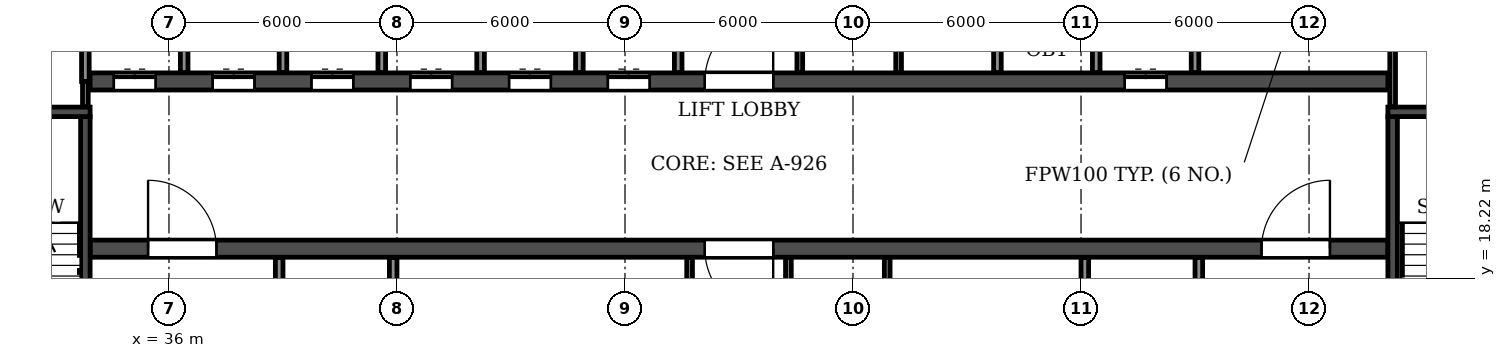
"""IFC4 building model, lengths in metres.
Left out: names, types, materials, properties, quantities, classifications, styles, units other than length and angle.
Written with IfcOpenShell. Run it as: python <this file> out.ifc"""

import sys

from ifc_helpers import new_model, si_unit, direction, frame, frame_2d, origin, place, context, subcontext, project, spatial, rectangle, extrude, element, fill, save


model = new_model("IFC4")
c1 = context("Model", 3, precision=1e-05, world=origin(), true_north=direction((0.0, 1.0)))
c2 = subcontext(c1, "Body", "Model", "MODEL_VIEW")
j1 = project(units=[si_unit("LENGTHUNIT", "METRE"), si_unit("PLANEANGLEUNIT", "RADIAN")], contexts=[c1])
p1 = place(None, origin())
s1 = spatial("IfcSite", under=j1, at=p1, CompositionType="ELEMENT")
p2 = place(p1, origin())
s2 = spatial("IfcBuilding", under=s1, at=p2, CompositionType="ELEMENT")
p3 = place(p2, frame((0.0, 0.0, 142.2)))
s3 = spatial("IfcBuildingStorey", under=s2, at=p3, CompositionType="ELEMENT", Elevation=142.2)
p4 = place(p3, frame((33.925, 19.0, 0.0), z_axis=(0.0, 0.0, 1.0), x_axis=(1.0, 0.0, 0.0)))
e1 = element("IfcWall", 1, at=p4, inside=s3, PredefinedType="SOLIDWALL", context=c2, shape_type="SweptSolid", body=[
    extrude(rectangle(XDim=34.15, YDim=0.45, at=frame_2d((17.075, 0.0))), origin(), (0.0, 0.0, 1.0), 3.07),
])
p5 = place(p4, frame((16.175, 0.0, 0.0)))
e2 = element("IfcOpeningElement", 2, at=p5, cuts=e1, PredefinedType="OPENING", context=c2, shape_type="SweptSolid", body=[
    extrude(rectangle(XDim=1.8, YDim=2.1, at=frame_2d((0.9, 1.05))), frame((0.0, 0.235, 0.0), z_axis=(0.0, -1.0, 0.0), x_axis=(1.0, 0.0, 0.0)), (0.0, 0.0, 1.0), 0.47),
])
p6 = place(p4, frame((1.525, 0.0, 0.0)))
e3 = element("IfcOpeningElement", 3, at=p6, cuts=e1, PredefinedType="OPENING", context=c2, shape_type="SweptSolid", body=[
    extrude(rectangle(XDim=1.8, YDim=2.1, at=frame_2d((0.9, 1.05))), frame((0.0, 0.235, 0.0), z_axis=(0.0, -1.0, 0.0), x_axis=(1.0, 0.0, 0.0)), (0.0, 0.0, 1.0), 0.47),
])
p7 = place(p4, frame((30.825, 0.0, 0.0)))
e4 = element("IfcOpeningElement", 4, at=p7, cuts=e1, PredefinedType="OPENING", context=c2, shape_type="SweptSolid", body=[
    extrude(rectangle(XDim=1.8, YDim=2.1, at=frame_2d((0.9, 1.05))), frame((0.0, 0.235, 0.0), z_axis=(0.0, -1.0, 0.0), x_axis=(1.0, 0.0, 0.0)), (0.0, 0.0, 1.0), 0.47),
])
p8 = place(p3, frame((33.925, 23.4, 0.0), z_axis=(0.0, 0.0, 1.0), x_axis=(1.0, 0.0, 0.0)))
e5 = element("IfcWall", 5, at=p8, inside=s3, PredefinedType="SOLIDWALL", context=c2, shape_type="SweptSolid", body=[
    extrude(rectangle(XDim=34.15, YDim=0.45, at=frame_2d((17.075, 0.0))), origin(), (0.0, 0.0, 1.0), 3.07),
])
p9 = place(p8, frame((16.175, 0.0, 0.0)))
e6 = element("IfcOpeningElement", 6, at=p9, cuts=e5, PredefinedType="OPENING", context=c2, shape_type="SweptSolid", body=[
    extrude(rectangle(XDim=1.8, YDim=2.1, at=frame_2d((0.9, 1.05))), frame((0.0, 0.235, 0.0), z_axis=(0.0, -1.0, 0.0), x_axis=(1.0, 0.0, 0.0)), (0.0, 0.0, 1.0), 0.47),
])
p10 = place(p8, frame((0.625, 0.0, 0.0)))
e7 = element("IfcOpeningElement", 7, at=p10, cuts=e5, PredefinedType="OPENING", context=c2, shape_type="SweptSolid", body=[
    extrude(rectangle(XDim=1.1, YDim=2.1, at=frame_2d((0.55, 1.05))), frame((0.0, 0.235, 0.0), z_axis=(0.0, -1.0, 0.0), x_axis=(1.0, 0.0, 0.0)), (0.0, 0.0, 1.0), 0.47),
])
p11 = place(p8, frame((3.225, 0.0, 0.0)))
e8 = element("IfcOpeningElement", 8, at=p11, cuts=e5, PredefinedType="OPENING", context=c2, shape_type="SweptSolid", body=[
    extrude(rectangle(XDim=1.1, YDim=2.1, at=frame_2d((0.55, 1.05))), frame((0.0, 0.235, 0.0), z_axis=(0.0, -1.0, 0.0), x_axis=(1.0, 0.0, 0.0)), (0.0, 0.0, 1.0), 0.47),
])
p12 = place(p8, frame((5.825, 0.0, 0.0)))
e9 = element("IfcOpeningElement", 9, at=p12, cuts=e5, PredefinedType="OPENING", context=c2, shape_type="SweptSolid", body=[
    extrude(rectangle(XDim=1.1, YDim=2.1, at=frame_2d((0.55, 1.05))), frame((0.0, 0.235, 0.0), z_axis=(0.0, -1.0, 0.0), x_axis=(1.0, 0.0, 0.0)), (0.0, 0.0, 1.0), 0.47),
])
p13 = place(p8, frame((8.425, 0.0, 0.0)))
e10 = element("IfcOpeningElement", 10, at=p13, cuts=e5, PredefinedType="OPENING", context=c2, shape_type="SweptSolid", body=[
    extrude(rectangle(XDim=1.1, YDim=2.1, at=frame_2d((0.55, 1.05))), frame((0.0, 0.235, 0.0), z_axis=(0.0, -1.0, 0.0), x_axis=(1.0, 0.0, 0.0)), (0.0, 0.0, 1.0), 0.47),
])
p14 = place(p8, frame((11.025, 0.0, 0.0)))
e11 = element("IfcOpeningElement", 11, at=p14, cuts=e5, PredefinedType="OPENING", context=c2, shape_type="SweptSolid", body=[
    extrude(rectangle(XDim=1.1, YDim=2.1, at=frame_2d((0.55, 1.05))), frame((0.0, 0.235, 0.0), z_axis=(0.0, -1.0, 0.0), x_axis=(1.0, 0.0, 0.0)), (0.0, 0.0, 1.0), 0.47),
])
p15 = place(p8, frame((13.625, 0.0, 0.0)))
e12 = element("IfcOpeningElement", 12, at=p15, cuts=e5, PredefinedType="OPENING", context=c2, shape_type="SweptSolid", body=[
    extrude(rectangle(XDim=1.1, YDim=2.1, at=frame_2d((0.55, 1.05))), frame((0.0, 0.235, 0.0), z_axis=(0.0, -1.0, 0.0), x_axis=(1.0, 0.0, 0.0)), (0.0, 0.0, 1.0), 0.47),
])
p16 = place(p8, frame((27.225, 0.0, 0.0)))
e13 = element("IfcOpeningElement", 13, at=p16, cuts=e5, PredefinedType="OPENING", context=c2, shape_type="SweptSolid", body=[
    extrude(rectangle(XDim=1.1, YDim=2.1, at=frame_2d((0.55, 1.05))), frame((0.0, 0.235, 0.0), z_axis=(0.0, -1.0, 0.0), x_axis=(1.0, 0.0, 0.0)), (0.0, 0.0, 1.0), 0.47),
])
p17 = place(p3, frame((33.8, 14.825, 0.0), z_axis=(0.0, 0.0, 1.0), x_axis=(0.0, 1.0, 0.0)))
e14 = element("IfcWall", 14, at=p17, inside=s3, PredefinedType="SOLIDWALL", context=c2, shape_type="SweptSolid", body=[
    extrude(rectangle(XDim=7.65, YDim=0.25, at=frame_2d((3.825, 0.0))), origin(), (0.0, 0.0, 1.0), 3.07),
])
p18 = place(p17, frame((0.475, 0.0, 0.0)))
e15 = element("IfcOpeningElement", 15, at=p18, cuts=e14, PredefinedType="OPENING", context=c2, shape_type="SweptSolid", body=[
    extrude(rectangle(XDim=1.0, YDim=2.1, at=frame_2d((0.5, 1.05))), frame((0.0, 0.135, 0.0), z_axis=(0.0, -1.0, 0.0), x_axis=(1.0, 0.0, 0.0)), (0.0, 0.0, 1.0), 0.27),
])
p19 = place(p3, frame((29.875, 22.6, 0.0), z_axis=(0.0, 0.0, 1.0), x_axis=(1.0, 0.0, 0.0)))
e16 = element("IfcWall", 16, at=p19, inside=s3, PredefinedType="SOLIDWALL", context=c2, shape_type="SweptSolid", body=[
    extrude(rectangle(XDim=4.05, YDim=0.25, at=frame_2d((2.025, 0.0))), origin(), (0.0, 0.0, 1.0), 3.07),
])
p20 = place(p3, frame((68.2, 14.825, 0.0), z_axis=(0.0, 0.0, 1.0), x_axis=(0.0, 1.0, 0.0)))
e17 = element("IfcWall", 17, at=p20, inside=s3, PredefinedType="SOLIDWALL", context=c2, shape_type="SweptSolid", body=[
    extrude(rectangle(XDim=7.65, YDim=0.25, at=frame_2d((3.825, 0.0))), origin(), (0.0, 0.0, 1.0), 3.07),
])
p21 = place(p20, frame((0.475, 0.0, 0.0)))
e18 = element("IfcOpeningElement", 18, at=p21, cuts=e17, PredefinedType="OPENING", context=c2, shape_type="SweptSolid", body=[
    extrude(rectangle(XDim=1.0, YDim=2.1, at=frame_2d((0.5, 1.05))), frame((0.0, 0.135, 0.0), z_axis=(0.0, -1.0, 0.0), x_axis=(1.0, 0.0, 0.0)), (0.0, 0.0, 1.0), 0.27),
])
p22 = place(p3, frame((68.075, 22.6, 0.0), z_axis=(0.0, 0.0, 1.0), x_axis=(1.0, 0.0, 0.0)))
e19 = element("IfcWall", 19, at=p22, inside=s3, PredefinedType="SOLIDWALL", context=c2, shape_type="SweptSolid", body=[
    extrude(rectangle(XDim=4.05, YDim=0.25, at=frame_2d((2.025, 0.0))), origin(), (0.0, 0.0, 1.0), 3.07),
])
for number, where, z_axis, x_axis in (
    (20, (49.7, 14.835, 0.0), (0.0, 0.0, 1.0), (0.0, 1.0, 0.0)),
    (21, (52.3, 14.835, 0.0), (0.0, 0.0, 1.0), (0.0, 1.0, 0.0)),
    (22, (52.6, 23.635, 0.0), (0.0, 0.0, 1.0), (0.0, 1.0, 0.0)),
    (23, (54.9, 14.835, 0.0), (0.0, 0.0, 1.0), (0.0, 1.0, 0.0)),
    (24, (55.2, 23.635, 0.0), (0.0, 0.0, 1.0), (0.0, 1.0, 0.0)),
):
    element("IfcWall", number, at=place(p3, frame(where, z_axis=z_axis, x_axis=x_axis)), inside=s3, PredefinedType="PARTITIONING", context=c2, shape_type="SweptSolid", body=[
        extrude(rectangle(XDim=3.93, YDim=0.15, at=frame_2d((1.965, 0.0))), origin(), (0.0, 0.0, 1.0), 3.07),
    ])
p23 = place(p3, frame((33.8, 22.735, 0.0), z_axis=(0.0, 0.0, 1.0), x_axis=(0.0, 1.0, 0.0)))
e25 = element("IfcWall", 25, at=p23, inside=s3, PredefinedType="PARTITIONING", context=c2, shape_type="SweptSolid", body=[
    extrude(rectangle(XDim=0.665, YDim=0.15, at=frame_2d((0.333, 0.0))), origin(), (0.0, 0.0, 1.0), 3.07),
])
p24 = place(p3, frame((68.2, 22.735, 0.0), z_axis=(0.0, 0.0, 1.0), x_axis=(0.0, 1.0, 0.0)))
e26 = element("IfcWall", 26, at=p24, inside=s3, PredefinedType="PARTITIONING", context=c2, shape_type="SweptSolid", body=[
    extrude(rectangle(XDim=4.83, YDim=0.15, at=frame_2d((2.415, 0.0))), origin(), (0.0, 0.0, 1.0), 3.07),
])
p25 = place(p3, frame((33.8, 23.4, 0.0), z_axis=(0.0, 0.0, 1.0), x_axis=(0.0, 1.0, 0.0)))
e27 = element("IfcWall", 27, at=p25, inside=s3, PredefinedType="PARTITIONING", context=c2, shape_type="SweptSolid", body=[
    extrude(rectangle(XDim=2.7, YDim=0.2, at=frame_2d((1.35, 0.0))), origin(), (0.0, 0.0, 1.0), 3.07),
])
p26 = place(p3, frame((36.4, 23.635, 0.0), z_axis=(0.0, 0.0, 1.0), x_axis=(0.0, 1.0, 0.0)))
e28 = element("IfcWall", 28, at=p26, inside=s3, PredefinedType="PARTITIONING", context=c2, shape_type="SweptSolid", body=[
    extrude(rectangle(XDim=2.465, YDim=0.2, at=frame_2d((1.232, 0.0))), origin(), (0.0, 0.0, 1.0), 3.07),
])
p27 = place(p3, frame((38.9, 14.835, 0.0), z_axis=(0.0, 0.0, 1.0), x_axis=(0.0, 1.0, 0.0)))
e29 = element("IfcWall", 29, at=p27, inside=s3, PredefinedType="PARTITIONING", context=c2, shape_type="SweptSolid", body=[
    extrude(rectangle(XDim=3.93, YDim=0.2, at=frame_2d((1.965, 0.0))), origin(), (0.0, 0.0, 1.0), 3.07),
])
p28 = place(p27, frame((1.415, 0.0, 0.0)))
e30 = element("IfcOpeningElement", 30, at=p28, cuts=e29, PredefinedType="OPENING", context=c2, shape_type="SweptSolid", body=[
    extrude(rectangle(XDim=1.1, YDim=2.1, at=frame_2d((0.55, 1.05))), frame((0.0, 0.11, 0.0), z_axis=(0.0, -1.0, 0.0), x_axis=(1.0, 0.0, 0.0)), (0.0, 0.0, 1.0), 0.22),
])
for number, where, z_axis, x_axis in (
    (31, (39.0, 23.635, 0.0), (0.0, 0.0, 1.0), (0.0, 1.0, 0.0)),
    (32, (41.6, 23.635, 0.0), (0.0, 0.0, 1.0), (0.0, 1.0, 0.0)),
):
    element("IfcWall", number, at=place(p3, frame(where, z_axis=z_axis, x_axis=x_axis)), inside=s3, PredefinedType="PARTITIONING", context=c2, shape_type="SweptSolid", body=[
        extrude(rectangle(XDim=2.465, YDim=0.2, at=frame_2d((1.232, 0.0))), origin(), (0.0, 0.0, 1.0), 3.07),
    ])
for number, where, z_axis, x_axis in (
    (33, (41.9, 14.835, 0.0), (0.0, 0.0, 1.0), (0.0, 1.0, 0.0)),
    (34, (44.2, 23.635, 0.0), (0.0, 0.0, 1.0), (0.0, 1.0, 0.0)),
    (35, (46.8, 23.635, 0.0), (0.0, 0.0, 1.0), (0.0, 1.0, 0.0)),
):
    element("IfcWall", number, at=place(p3, frame(where, z_axis=z_axis, x_axis=x_axis)), inside=s3, PredefinedType="PARTITIONING", context=c2, shape_type="SweptSolid", body=[
        extrude(rectangle(XDim=3.93, YDim=0.2, at=frame_2d((1.965, 0.0))), origin(), (0.0, 0.0, 1.0), 3.07),
    ])
for number, where, z_axis, x_axis in (
    (36, (49.4, 23.635, 0.0), (0.0, 0.0, 1.0), (0.0, 1.0, 0.0)),
    (37, (57.8, 23.635, 0.0), (0.0, 0.0, 1.0), (0.0, 1.0, 0.0)),
):
    element("IfcWall", number, at=place(p3, frame(where, z_axis=z_axis, x_axis=x_axis)), inside=s3, PredefinedType="PARTITIONING", context=c2, shape_type="SweptSolid", body=[
        extrude(rectangle(XDim=2.465, YDim=0.2, at=frame_2d((1.232, 0.0))), origin(), (0.0, 0.0, 1.0), 3.07),
    ])
p29 = place(p3, frame((60.1, 14.835, 0.0), z_axis=(0.0, 0.0, 1.0), x_axis=(0.0, 1.0, 0.0)))
e38 = element("IfcWall", 38, at=p29, inside=s3, PredefinedType="PARTITIONING", context=c2, shape_type="SweptSolid", body=[
    extrude(rectangle(XDim=3.93, YDim=0.2, at=frame_2d((1.965, 0.0))), origin(), (0.0, 0.0, 1.0), 3.07),
])
for number, where, z_axis, x_axis in (
    (39, (60.4, 23.635, 0.0), (0.0, 0.0, 1.0), (0.0, 1.0, 0.0)),
    (40, (63.0, 23.635, 0.0), (0.0, 0.0, 1.0), (0.0, 1.0, 0.0)),
):
    element("IfcWall", number, at=place(p3, frame(where, z_axis=z_axis, x_axis=x_axis)), inside=s3, PredefinedType="PARTITIONING", context=c2, shape_type="SweptSolid", body=[
        extrude(rectangle(XDim=2.465, YDim=0.2, at=frame_2d((1.232, 0.0))), origin(), (0.0, 0.0, 1.0), 3.07),
    ])
p30 = place(p3, frame((63.1, 14.835, 0.0), z_axis=(0.0, 0.0, 1.0), x_axis=(0.0, 1.0, 0.0)))
e41 = element("IfcWall", 41, at=p30, inside=s3, PredefinedType="PARTITIONING", context=c2, shape_type="SweptSolid", body=[
    extrude(rectangle(XDim=3.93, YDim=0.2, at=frame_2d((1.965, 0.0))), origin(), (0.0, 0.0, 1.0), 3.07),
])
p31 = place(p30, frame((1.415, 0.0, 0.0)))
e42 = element("IfcOpeningElement", 42, at=p31, cuts=e41, PredefinedType="OPENING", context=c2, shape_type="SweptSolid", body=[
    extrude(rectangle(XDim=1.1, YDim=2.1, at=frame_2d((0.55, 1.05))), frame((0.0, 0.11, 0.0), z_axis=(0.0, -1.0, 0.0), x_axis=(1.0, 0.0, 0.0)), (0.0, 0.0, 1.0), 0.22),
])
p32 = place(p9, origin())
e43 = element("IfcDoor", 43, at=p32, inside=s3, OperationType="DOUBLE_DOOR_SINGLE_SWING", PredefinedType="DOOR", context=c2, shape_type="SweptSolid", body=[
    extrude(rectangle(XDim=1.8, YDim=2.1, at=frame_2d((0.9, 1.05))), frame((0.0, 0.025, 0.0), z_axis=(0.0, -1.0, 0.0), x_axis=(1.0, 0.0, 0.0)), (0.0, 0.0, 1.0), 0.05),
])
fill(e6, e43)
p33 = place(p5, frame((1.8, 0.0, 0.0), z_axis=(0.0, 0.0, 1.0), x_axis=(-1.0, 0.0, 0.0)))
e44 = element("IfcDoor", 44, at=p33, inside=s3, OperationType="DOUBLE_DOOR_SINGLE_SWING", PredefinedType="DOOR", context=c2, shape_type="SweptSolid", body=[
    extrude(rectangle(XDim=1.8, YDim=2.1, at=frame_2d((0.9, 1.05))), frame((0.0, 0.025, 0.0), z_axis=(0.0, -1.0, 0.0), x_axis=(1.0, 0.0, 0.0)), (0.0, 0.0, 1.0), 0.05),
])
fill(e2, e44)
p34 = place(p10, origin())
e45 = element("IfcDoor", 45, at=p34, inside=s3, OperationType="DOUBLE_DOOR_SLIDING", PredefinedType="DOOR", context=c2, shape_type="SweptSolid", body=[
    extrude(rectangle(XDim=1.1, YDim=2.1, at=frame_2d((0.55, 1.05))), frame((0.0, 0.025, 0.0), z_axis=(0.0, -1.0, 0.0), x_axis=(1.0, 0.0, 0.0)), (0.0, 0.0, 1.0), 0.05),
])
fill(e7, e45)
p35 = place(p6, origin())
e46 = element("IfcDoor", 46, at=p35, inside=s3, OperationType="DOUBLE_DOOR_SINGLE_SWING", PredefinedType="DOOR", context=c2, shape_type="SweptSolid", body=[
    extrude(rectangle(XDim=1.8, YDim=2.1, at=frame_2d((0.9, 1.05))), frame((0.0, 0.025, 0.0), z_axis=(0.0, -1.0, 0.0), x_axis=(1.0, 0.0, 0.0)), (0.0, 0.0, 1.0), 0.05),
])
fill(e3, e46)
p36 = place(p11, origin())
e47 = element("IfcDoor", 47, at=p36, inside=s3, OperationType="DOUBLE_DOOR_SLIDING", PredefinedType="DOOR", context=c2, shape_type="SweptSolid", body=[
    extrude(rectangle(XDim=1.1, YDim=2.1, at=frame_2d((0.55, 1.05))), frame((0.0, 0.025, 0.0), z_axis=(0.0, -1.0, 0.0), x_axis=(1.0, 0.0, 0.0)), (0.0, 0.0, 1.0), 0.05),
])
fill(e8, e47)
p37 = place(p12, origin())
e48 = element("IfcDoor", 48, at=p37, inside=s3, OperationType="DOUBLE_DOOR_SLIDING", PredefinedType="DOOR", context=c2, shape_type="SweptSolid", body=[
    extrude(rectangle(XDim=1.1, YDim=2.1, at=frame_2d((0.55, 1.05))), frame((0.0, 0.025, 0.0), z_axis=(0.0, -1.0, 0.0), x_axis=(1.0, 0.0, 0.0)), (0.0, 0.0, 1.0), 0.05),
])
fill(e9, e48)
p38 = place(p13, origin())
e49 = element("IfcDoor", 49, at=p38, inside=s3, OperationType="DOUBLE_DOOR_SLIDING", PredefinedType="DOOR", context=c2, shape_type="SweptSolid", body=[
    extrude(rectangle(XDim=1.1, YDim=2.1, at=frame_2d((0.55, 1.05))), frame((0.0, 0.025, 0.0), z_axis=(0.0, -1.0, 0.0), x_axis=(1.0, 0.0, 0.0)), (0.0, 0.0, 1.0), 0.05),
])
fill(e10, e49)
p39 = place(p14, origin())
e50 = element("IfcDoor", 50, at=p39, inside=s3, OperationType="DOUBLE_DOOR_SLIDING", PredefinedType="DOOR", context=c2, shape_type="SweptSolid", body=[
    extrude(rectangle(XDim=1.1, YDim=2.1, at=frame_2d((0.55, 1.05))), frame((0.0, 0.025, 0.0), z_axis=(0.0, -1.0, 0.0), x_axis=(1.0, 0.0, 0.0)), (0.0, 0.0, 1.0), 0.05),
])
fill(e11, e50)
p40 = place(p15, origin())
e51 = element("IfcDoor", 51, at=p40, inside=s3, OperationType="DOUBLE_DOOR_SLIDING", PredefinedType="DOOR", context=c2, shape_type="SweptSolid", body=[
    extrude(rectangle(XDim=1.1, YDim=2.1, at=frame_2d((0.55, 1.05))), frame((0.0, 0.025, 0.0), z_axis=(0.0, -1.0, 0.0), x_axis=(1.0, 0.0, 0.0)), (0.0, 0.0, 1.0), 0.05),
])
fill(e12, e51)
p41 = place(p16, origin())
e52 = element("IfcDoor", 52, at=p41, inside=s3, OperationType="DOUBLE_DOOR_SLIDING", PredefinedType="DOOR", context=c2, shape_type="SweptSolid", body=[
    extrude(rectangle(XDim=1.1, YDim=2.1, at=frame_2d((0.55, 1.05))), frame((0.0, 0.025, 0.0), z_axis=(0.0, -1.0, 0.0), x_axis=(1.0, 0.0, 0.0)), (0.0, 0.0, 1.0), 0.05),
])
fill(e13, e52)
p42 = place(p7, origin())
e53 = element("IfcDoor", 53, at=p42, inside=s3, OperationType="DOUBLE_DOOR_SINGLE_SWING", PredefinedType="DOOR", context=c2, shape_type="SweptSolid", body=[
    extrude(rectangle(XDim=1.8, YDim=2.1, at=frame_2d((0.9, 1.05))), frame((0.0, 0.025, 0.0), z_axis=(0.0, -1.0, 0.0), x_axis=(1.0, 0.0, 0.0)), (0.0, 0.0, 1.0), 0.05),
])
fill(e4, e53)
save(model, sys.argv[1])
